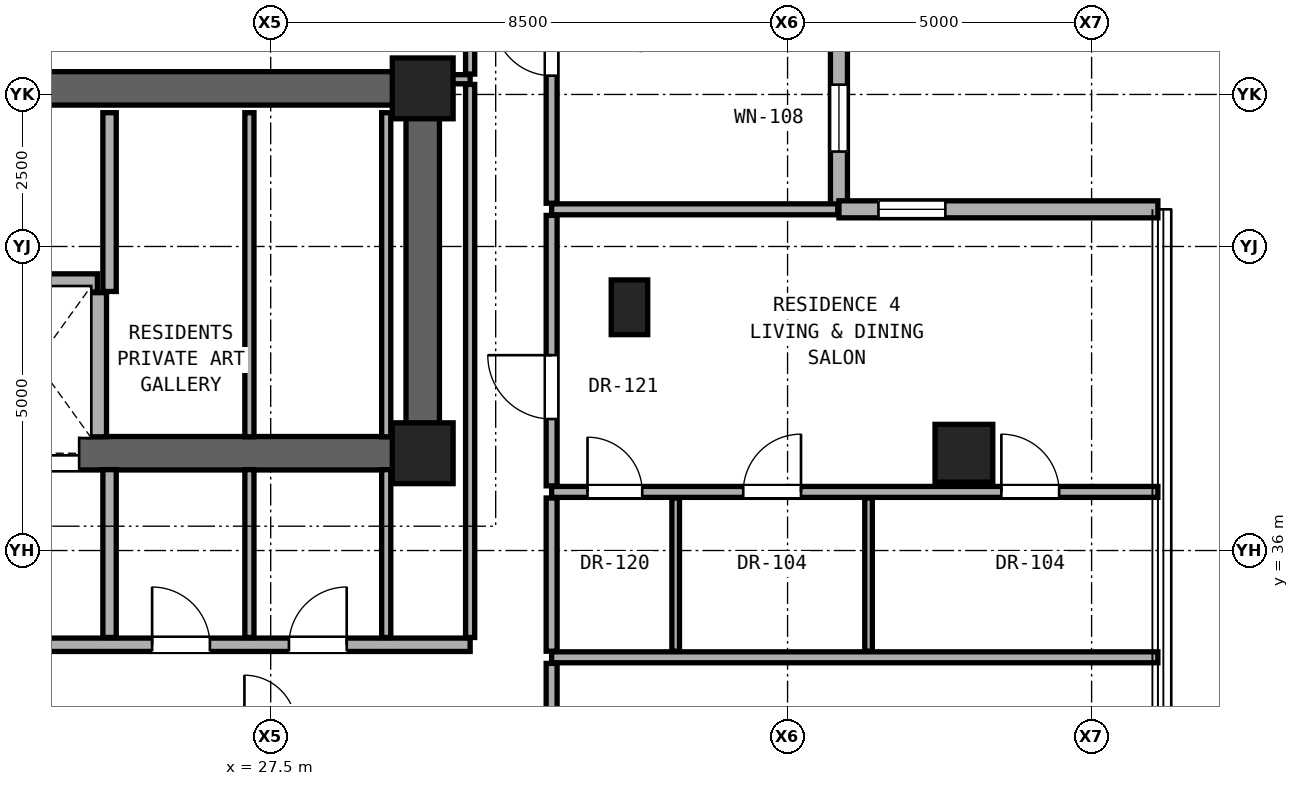
"""IFC4 building model, lengths in metres.
Left out: names, types, materials, properties, quantities, classifications, styles, units other than length and angle.
Written with IfcOpenShell. Run it as: python <this file> out.ifc"""

import sys

from ifc_helpers import new_model, si_unit, direction, frame, frame_2d, origin, origin_2d, place, context, subcontext, project, spatial, rectangle, hollow_rectangle, extrude, element, fill, save


model = new_model("IFC4")
c1 = context("Model", 3, precision=1e-05, world=origin(), true_north=direction((0.0, 1.0)))
c2 = subcontext(c1, "Body", "Model", "MODEL_VIEW")
j1 = project(units=[si_unit("LENGTHUNIT", "METRE"), si_unit("PLANEANGLEUNIT", "RADIAN")], contexts=[c1])
p1 = place(None, origin())
s1 = spatial("IfcSite", under=j1, at=p1, CompositionType="ELEMENT")
p2 = place(p1, origin())
s2 = spatial("IfcBuilding", under=s1, at=p2, CompositionType="ELEMENT")
p3 = place(p2, frame((0.0, 0.0, 177.15)))
s3 = spatial("IfcBuildingStorey", under=s2, at=p3, CompositionType="ELEMENT", Elevation=177.15)
for number, where, z_axis, x_axis in (
    (1, (30.0, 37.6, 0.0), (0.0, 0.0, 1.0), (1.0, 0.0, 0.0)),
    (2, (30.0, 43.6, 0.0), (0.0, 0.0, 1.0), (1.0, 0.0, 0.0)),
):
    element("IfcColumn", number, at=place(p3, frame(where, z_axis=z_axis, x_axis=x_axis)), inside=s3, PredefinedType="COLUMN", context=c2, shape_type="SweptSolid", body=[
        extrude(rectangle(XDim=1.0, YDim=1.0, at=origin_2d()), origin(), (0.0, 0.0, 1.0), 3.25),
    ])
p4 = place(p3, frame((38.9, 37.6, 0.0), z_axis=(0.0, 0.0, 1.0), x_axis=(1.0, 0.0, 0.0)))
e3 = element("IfcColumn", 3, at=p4, inside=s3, PredefinedType="COLUMN", context=c2, shape_type="SweptSolid", body=[
    extrude(hollow_rectangle(XDim=0.95, YDim=0.95, WallThickness=0.05, at=origin_2d()), origin(), (0.0, 0.0, 1.0), 3.25),
])
p5 = place(p3, frame((33.4, 40.0, 0.0), z_axis=(0.0, 0.0, 1.0), x_axis=(1.0, 0.0, 0.0)))
e4 = element("IfcColumn", 4, at=p5, inside=s3, PredefinedType="PILASTER", context=c2, shape_type="SweptSolid", body=[
    extrude(rectangle(XDim=0.6, YDim=0.9, at=origin_2d()), origin(), (0.0, 0.0, 1.0), 3.25),
])
p6 = place(p3, frame((11.0, 43.6, 0.0), z_axis=(0.0, 0.0, 1.0), x_axis=(1.0, 0.0, 0.0)))
e5 = element("IfcWall", 5, at=p6, inside=s3, PredefinedType="SHEAR", context=c2, shape_type="SweptSolid", body=[
    extrude(rectangle(XDim=19.0, YDim=0.55, at=frame_2d((9.5, 0.0))), origin(), (0.0, 0.0, 1.0), 3.05),
])
p7 = place(p3, frame((30.0, 37.6, 0.0), z_axis=(0.0, 0.0, 1.0), x_axis=(0.0, 1.0, 0.0)))
e6 = element("IfcWall", 6, at=p7, inside=s3, PredefinedType="SHEAR", context=c2, shape_type="SweptSolid", body=[
    extrude(rectangle(XDim=6.0, YDim=0.55, at=frame_2d((3.0, 0.0))), origin(), (0.0, 0.0, 1.0), 3.05),
])
p8 = place(p3, frame((11.0, 37.6, 0.0), z_axis=(0.0, 0.0, 1.0), x_axis=(1.0, 0.0, 0.0)))
e7 = element("IfcWall", 7, at=p8, inside=s3, PredefinedType="SHEAR", context=c2, shape_type="SweptSolid", body=[
    extrude(rectangle(XDim=19.0, YDim=0.55, at=frame_2d((9.5, 0.0))), origin(), (0.0, 0.0, 1.0), 3.05),
])
p9 = place(p8, frame((1.06, 0.0, 0.0)))
e8 = element("IfcOpeningElement", 8, at=p9, cuts=e7, PredefinedType="OPENING", context=c2, shape_type="SweptSolid", body=[
    extrude(rectangle(XDim=1.15, YDim=2.2, at=frame_2d((0.575, 1.1))), frame((0.0, 0.285, 0.0), z_axis=(0.0, -1.0, 0.0), x_axis=(1.0, 0.0, 0.0)), (0.0, 0.0, 1.0), 0.57),
])
p10 = place(p8, frame((9.55, 0.0, 0.0)))
e9 = element("IfcOpeningElement", 9, at=p10, cuts=e7, PredefinedType="OPENING", context=c2, shape_type="SweptSolid", body=[
    extrude(rectangle(XDim=1.4, YDim=2.35, at=frame_2d((0.7, 1.175))), frame((0.0, 0.285, 0.0), z_axis=(0.0, -1.0, 0.0), x_axis=(1.0, 0.0, 0.0)), (0.0, 0.0, 1.0), 0.57),
])
p11 = place(p8, frame((11.95, 0.0, 0.0)))
e10 = element("IfcOpeningElement", 10, at=p11, cuts=e7, PredefinedType="OPENING", context=c2, shape_type="SweptSolid", body=[
    extrude(rectangle(XDim=1.4, YDim=2.35, at=frame_2d((0.7, 1.175))), frame((0.0, 0.285, 0.0), z_axis=(0.0, -1.0, 0.0), x_axis=(1.0, 0.0, 0.0)), (0.0, 0.0, 1.0), 0.57),
])
p12 = place(p3, frame((36.845, 41.611, 0.0), z_axis=(0.0, 0.0, 1.0), x_axis=(0.0, 1.0, 0.0)))
e11 = element("IfcWall", 11, at=p12, inside=s3, PredefinedType="SOLIDWALL", context=c2, shape_type="SweptSolid", body=[
    extrude(rectangle(XDim=5.245, YDim=0.28, at=frame_2d((2.623, 0.0))), origin(), (0.0, 0.0, 1.0), 3.03),
])
p13 = place(p12, frame((0.95, 0.0, 0.85)))
e12 = element("IfcOpeningElement", 12, at=p13, cuts=e11, PredefinedType="OPENING", context=c2, shape_type="SweptSolid", body=[
    extrude(rectangle(XDim=1.1, YDim=2.0, at=frame_2d((0.55, 1.0))), frame((0.0, 0.15, 0.0), z_axis=(0.0, -1.0, 0.0), x_axis=(1.0, 0.0, 0.0)), (0.0, 0.0, 1.0), 0.3),
])
p14 = place(p3, frame((42.09, 41.611, 0.0), z_axis=(0.0, 0.0, 1.0), x_axis=(-1.0, 0.0, 0.0)))
e13 = element("IfcWall", 13, at=p14, inside=s3, PredefinedType="SOLIDWALL", context=c2, shape_type="SweptSolid", body=[
    extrude(rectangle(XDim=5.245, YDim=0.28, at=frame_2d((2.623, 0.0))), origin(), (0.0, 0.0, 1.0), 3.03),
])
p15 = place(p14, frame((3.495, 0.0, 0.85)))
e14 = element("IfcOpeningElement", 14, at=p15, cuts=e13, PredefinedType="OPENING", context=c2, shape_type="SweptSolid", body=[
    extrude(rectangle(XDim=1.1, YDim=2.0, at=frame_2d((0.55, 1.0))), frame((0.0, 0.15, 0.0), z_axis=(0.0, -1.0, 0.0), x_axis=(1.0, 0.0, 0.0)), (0.0, 0.0, 1.0), 0.3),
])
p16 = place(p3, frame((32.12, 34.244, 0.0), z_axis=(0.0, 0.0, 1.0), x_axis=(1.0, 0.0, 0.0)))
e15 = element("IfcWall", 15, at=p16, inside=s3, PredefinedType="PARTITIONING", context=c2, shape_type="SweptSolid", body=[
    extrude(rectangle(XDim=9.97, YDim=0.18, at=frame_2d((4.985, 0.0))), origin(), (0.0, 0.0, 1.0), 2.269),
])
p17 = place(p3, frame((15.59, 34.45, 0.0), z_axis=(0.0, 0.0, 1.0), x_axis=(1.0, 0.0, 0.0)))
e16 = element("IfcWall", 16, at=p17, inside=s3, PredefinedType="SOLIDWALL", context=c2, shape_type="SweptSolid", body=[
    extrude(rectangle(XDim=15.19, YDim=0.22, at=frame_2d((7.595, 0.0))), origin(), (0.0, 0.0, 1.0), 2.186),
])
p18 = place(p17, frame((6.435, 0.0, 0.0)))
e17 = element("IfcOpeningElement", 17, at=p18, cuts=e16, PredefinedType="OPENING", context=c2, shape_type="SweptSolid", body=[
    extrude(rectangle(XDim=0.85, YDim=2.01, at=frame_2d((0.425, 1.005))), frame((0.0, 0.12, 0.0), z_axis=(0.0, -1.0, 0.0), x_axis=(1.0, 0.0, 0.0)), (0.0, 0.0, 1.0), 0.24),
])
p19 = place(p17, frame((9.96, 0.0, 0.0)))
e18 = element("IfcOpeningElement", 18, at=p19, cuts=e16, PredefinedType="OPENING", context=c2, shape_type="SweptSolid", body=[
    extrude(rectangle(XDim=0.95, YDim=2.15, at=frame_2d((0.475, 1.075))), frame((0.0, 0.12, 0.0), z_axis=(0.0, -1.0, 0.0), x_axis=(1.0, 0.0, 0.0)), (0.0, 0.0, 1.0), 0.24),
])
p20 = place(p17, frame((12.21, 0.0, 0.0)))
e19 = element("IfcOpeningElement", 19, at=p20, cuts=e16, PredefinedType="OPENING", context=c2, shape_type="SweptSolid", body=[
    extrude(rectangle(XDim=0.95, YDim=2.15, at=frame_2d((0.475, 1.075))), frame((0.0, 0.12, 0.0), z_axis=(0.0, -1.0, 0.0), x_axis=(1.0, 0.0, 0.0)), (0.0, 0.0, 1.0), 0.24),
])
p21 = place(p17, frame((0.675, 0.0, 0.0)))
e20 = element("IfcOpeningElement", 20, at=p21, cuts=e16, PredefinedType="OPENING", context=c2, shape_type="SweptSolid", body=[
    extrude(rectangle(XDim=0.85, YDim=2.01, at=frame_2d((0.425, 1.005))), frame((0.0, 0.12, 0.0), z_axis=(0.0, -1.0, 0.0), x_axis=(1.0, 0.0, 0.0)), (0.0, 0.0, 1.0), 0.24),
])
p22 = place(p17, frame((2.835, 0.0, 0.0)))
e21 = element("IfcOpeningElement", 21, at=p22, cuts=e16, PredefinedType="OPENING", context=c2, shape_type="SweptSolid", body=[
    extrude(rectangle(XDim=0.85, YDim=2.01, at=frame_2d((0.425, 1.005))), frame((0.0, 0.12, 0.0), z_axis=(0.0, -1.0, 0.0), x_axis=(1.0, 0.0, 0.0)), (0.0, 0.0, 1.0), 0.24),
])
p23 = place(p3, frame((32.12, 36.964, 0.0), z_axis=(0.0, 0.0, 1.0), x_axis=(1.0, 0.0, 0.0)))
e22 = element("IfcWall", 22, at=p23, inside=s3, PredefinedType="PARTITIONING", context=c2, shape_type="SweptSolid", body=[
    extrude(rectangle(XDim=9.97, YDim=0.18, at=frame_2d((4.985, 0.0))), origin(), (0.0, 0.0, 1.0), 2.269),
])
p24 = place(p23, frame((7.396, 0.0, 0.0)))
e23 = element("IfcOpeningElement", 23, at=p24, cuts=e22, PredefinedType="OPENING", context=c2, shape_type="SweptSolid", body=[
    extrude(rectangle(XDim=0.95, YDim=2.15, at=frame_2d((0.475, 1.075))), frame((0.0, 0.1, 0.0), z_axis=(0.0, -1.0, 0.0), x_axis=(1.0, 0.0, 0.0)), (0.0, 0.0, 1.0), 0.2),
])
p25 = place(p23, frame((3.151, 0.0, 0.0)))
e24 = element("IfcOpeningElement", 24, at=p25, cuts=e22, PredefinedType="OPENING", context=c2, shape_type="SweptSolid", body=[
    extrude(rectangle(XDim=0.95, YDim=2.15, at=frame_2d((0.475, 1.075))), frame((0.0, 0.1, 0.0), z_axis=(0.0, -1.0, 0.0), x_axis=(1.0, 0.0, 0.0)), (0.0, 0.0, 1.0), 0.2),
])
p26 = place(p23, frame((0.59, 0.0, 0.0)))
e25 = element("IfcOpeningElement", 25, at=p26, cuts=e22, PredefinedType="OPENING", context=c2, shape_type="SweptSolid", body=[
    extrude(rectangle(XDim=0.9, YDim=2.1, at=frame_2d((0.45, 1.05))), frame((0.0, 0.1, 0.0), z_axis=(0.0, -1.0, 0.0), x_axis=(1.0, 0.0, 0.0)), (0.0, 0.0, 1.0), 0.2),
])
p27 = place(p3, frame((20.25, 40.4, 0.0), z_axis=(0.0, 0.0, 1.0), x_axis=(1.0, 0.0, 0.0)))
e26 = element("IfcWall", 26, at=p27, inside=s3, PredefinedType="SOLIDWALL", context=c2, shape_type="SweptSolid", body=[
    extrude(rectangle(XDim=4.4, YDim=0.3, at=frame_2d((2.2, 0.0))), origin(), (0.0, 0.0, 1.0), 3.05),
])
p28 = place(p3, frame((32.12, 41.611, 0.0), z_axis=(0.0, 0.0, 1.0), x_axis=(1.0, 0.0, 0.0)))
e27 = element("IfcWall", 27, at=p28, inside=s3, PredefinedType="PARTITIONING", context=c2, shape_type="SweptSolid", body=[
    extrude(rectangle(XDim=4.705, YDim=0.18, at=frame_2d((2.353, 0.0))), origin(), (0.0, 0.0, 1.0), 3.05),
])
p29 = place(p3, frame((30.27, 43.75, 0.0), z_axis=(0.0, 0.0, 1.0), x_axis=(1.0, 0.0, 0.0)))
e28 = element("IfcWall", 28, at=p29, inside=s3, PredefinedType="PARTITIONING", context=c2, shape_type="SweptSolid", body=[
    extrude(rectangle(XDim=0.51, YDim=0.15, at=frame_2d((0.255, 0.0))), origin(), (0.0, 0.0, 1.0), 3.05),
])
p30 = place(p3, frame((24.65, 37.87, 0.0), z_axis=(0.0, 0.0, 1.0), x_axis=(0.0, 1.0, 0.0)))
e29 = element("IfcWall", 29, at=p30, inside=s3, PredefinedType="SOLIDWALL", context=c2, shape_type="SweptSolid", body=[
    extrude(rectangle(XDim=2.37, YDim=0.3, at=frame_2d((1.185, 0.0))), origin(), (0.0, 0.0, 1.0), 3.05),
])
p31 = place(p3, frame((24.85, 34.57, 0.0), z_axis=(0.0, 0.0, 1.0), x_axis=(0.0, 1.0, 0.0)))
e30 = element("IfcWall", 30, at=p31, inside=s3, PredefinedType="SOLIDWALL", context=c2, shape_type="SweptSolid", body=[
    extrude(rectangle(XDim=2.76, YDim=0.22, at=frame_2d((1.38, 0.0))), origin(), (0.0, 0.0, 1.0), 3.05),
])
p32 = place(p3, frame((24.85, 40.26, 0.0), z_axis=(0.0, 0.0, 1.0), x_axis=(0.0, 1.0, 0.0)))
e31 = element("IfcWall", 31, at=p32, inside=s3, PredefinedType="SOLIDWALL", context=c2, shape_type="SweptSolid", body=[
    extrude(rectangle(XDim=2.94, YDim=0.22, at=frame_2d((1.47, 0.0))), origin(), (0.0, 0.0, 1.0), 3.05),
])
p33 = place(p3, frame((27.15, 34.57, 0.0), z_axis=(0.0, 0.0, 1.0), x_axis=(0.0, 1.0, 0.0)))
e32 = element("IfcWall", 32, at=p33, inside=s3, PredefinedType="PARTITIONING", context=c2, shape_type="SweptSolid", body=[
    extrude(rectangle(XDim=2.76, YDim=0.15, at=frame_2d((1.38, 0.0))), origin(), (0.0, 0.0, 1.0), 3.05),
])
p34 = place(p3, frame((27.15, 37.87, 0.0), z_axis=(0.0, 0.0, 1.0), x_axis=(0.0, 1.0, 0.0)))
e33 = element("IfcWall", 33, at=p34, inside=s3, PredefinedType="PARTITIONING", context=c2, shape_type="SweptSolid", body=[
    extrude(rectangle(XDim=5.33, YDim=0.15, at=frame_2d((2.665, 0.0))), origin(), (0.0, 0.0, 1.0), 3.05),
])
p35 = place(p3, frame((29.4, 34.57, 0.0), z_axis=(0.0, 0.0, 1.0), x_axis=(0.0, 1.0, 0.0)))
e34 = element("IfcWall", 34, at=p35, inside=s3, PredefinedType="PARTITIONING", context=c2, shape_type="SweptSolid", body=[
    extrude(rectangle(XDim=2.76, YDim=0.15, at=frame_2d((1.38, 0.0))), origin(), (0.0, 0.0, 1.0), 3.05),
])
p36 = place(p3, frame((29.4, 37.87, 0.0), z_axis=(0.0, 0.0, 1.0), x_axis=(0.0, 1.0, 0.0)))
e35 = element("IfcWall", 35, at=p36, inside=s3, PredefinedType="PARTITIONING", context=c2, shape_type="SweptSolid", body=[
    extrude(rectangle(XDim=5.33, YDim=0.15, at=frame_2d((2.665, 0.0))), origin(), (0.0, 0.0, 1.0), 3.05),
])
p37 = place(p3, frame((30.78, 34.57, 0.0), z_axis=(0.0, 0.0, 1.0), x_axis=(0.0, 1.0, 0.0)))
e36 = element("IfcWall", 36, at=p37, inside=s3, PredefinedType="PARTITIONING", context=c2, shape_type="SweptSolid", body=[
    extrude(rectangle(XDim=9.095, YDim=0.15, at=frame_2d((4.547, 0.0))), origin(), (0.0, 0.0, 1.0), 2.442),
])
p38 = place(p3, frame((30.78, 43.835, 0.0), z_axis=(0.0, 0.0, 1.0), x_axis=(0.0, 1.0, 0.0)))
e37 = element("IfcWall", 37, at=p38, inside=s3, PredefinedType="PARTITIONING", context=c2, shape_type="SweptSolid", body=[
    extrude(rectangle(XDim=3.021, YDim=0.15, at=frame_2d((1.51, 0.0))), origin(), (0.0, 0.0, 1.0), 3.05),
])
p39 = place(p38, frame((0.986, 0.0, 0.0)))
e38 = element("IfcOpeningElement", 38, at=p39, cuts=e37, PredefinedType="OPENING", context=c2, shape_type="SweptSolid", body=[
    extrude(rectangle(XDim=1.05, YDim=2.2, at=frame_2d((0.525, 1.1))), frame((0.0, 0.085, 0.0), z_axis=(0.0, -1.0, 0.0), x_axis=(1.0, 0.0, 0.0)), (0.0, 0.0, 1.0), 0.17),
])
p40 = place(p3, frame((32.12, 30.631, 0.0), z_axis=(0.0, 0.0, 1.0), x_axis=(0.0, 1.0, 0.0)))
e39 = element("IfcWall", 39, at=p40, inside=s3, PredefinedType="PARTITIONING", context=c2, shape_type="SweptSolid", body=[
    extrude(rectangle(XDim=3.513, YDim=0.18, at=frame_2d((1.756, 0.0))), origin(), (0.0, 0.0, 1.0), 2.346),
])
p41 = place(p40, frame((1.231, 0.0, 0.0)))
e40 = element("IfcOpeningElement", 40, at=p41, cuts=e39, PredefinedType="OPENING", context=c2, shape_type="SweptSolid", body=[
    extrude(rectangle(XDim=1.05, YDim=2.2, at=frame_2d((0.525, 1.1))), frame((0.0, 0.1, 0.0), z_axis=(0.0, -1.0, 0.0), x_axis=(1.0, 0.0, 0.0)), (0.0, 0.0, 1.0), 0.2),
])
p42 = place(p3, frame((32.12, 34.344, 0.0), z_axis=(0.0, 0.0, 1.0), x_axis=(0.0, 1.0, 0.0)))
e41 = element("IfcWall", 41, at=p42, inside=s3, PredefinedType="PARTITIONING", context=c2, shape_type="SweptSolid", body=[
    extrude(rectangle(XDim=2.52, YDim=0.18, at=frame_2d((1.26, 0.0))), origin(), (0.0, 0.0, 1.0), 3.05),
])
p43 = place(p3, frame((32.12, 37.064, 0.0), z_axis=(0.0, 0.0, 1.0), x_axis=(0.0, 1.0, 0.0)))
e42 = element("IfcWall", 42, at=p43, inside=s3, PredefinedType="PARTITIONING", context=c2, shape_type="SweptSolid", body=[
    extrude(rectangle(XDim=4.447, YDim=0.18, at=frame_2d((2.224, 0.0))), origin(), (0.0, 0.0, 1.0), 2.442),
])
p44 = place(p43, frame((1.098, 0.0, 0.0)))
e43 = element("IfcOpeningElement", 43, at=p44, cuts=e42, PredefinedType="OPENING", context=c2, shape_type="SweptSolid", body=[
    extrude(rectangle(XDim=1.05, YDim=2.2, at=frame_2d((0.525, 1.1))), frame((0.0, 0.1, 0.0), z_axis=(0.0, -1.0, 0.0), x_axis=(1.0, 0.0, 0.0)), (0.0, 0.0, 1.0), 0.2),
])
p45 = place(p3, frame((32.12, 41.711, 0.0), z_axis=(0.0, 0.0, 1.0), x_axis=(0.0, 1.0, 0.0)))
e44 = element("IfcWall", 44, at=p45, inside=s3, PredefinedType="PARTITIONING", context=c2, shape_type="SweptSolid", body=[
    extrude(rectangle(XDim=5.145, YDim=0.18, at=frame_2d((2.573, 0.0))), origin(), (0.0, 0.0, 1.0), 3.05),
])
p46 = place(p45, frame((2.097, 0.0, 0.0)))
e45 = element("IfcOpeningElement", 45, at=p46, cuts=e44, PredefinedType="OPENING", context=c2, shape_type="SweptSolid", body=[
    extrude(rectangle(XDim=0.95, YDim=2.15, at=frame_2d((0.475, 1.075))), frame((0.0, 0.1, 0.0), z_axis=(0.0, -1.0, 0.0), x_axis=(1.0, 0.0, 0.0)), (0.0, 0.0, 1.0), 0.2),
])
for number, where, z_axis, x_axis in (
    (46, (34.16, 34.344, 0.0), (0.0, 0.0, 1.0), (0.0, 1.0, 0.0)),
    (47, (37.332, 34.344, 0.0), (0.0, 0.0, 1.0), (0.0, 1.0, 0.0)),
):
    element("IfcWall", number, at=place(p3, frame(where, z_axis=z_axis, x_axis=x_axis)), inside=s3, PredefinedType="PARTITIONING", context=c2, shape_type="SweptSolid", body=[
        extrude(rectangle(XDim=2.52, YDim=0.125, at=frame_2d((1.26, 0.0))), origin(), (0.0, 0.0, 1.0), 3.05),
    ])
p47 = place(p13, origin())
e48 = element("IfcWindow", 48, at=p47, inside=s3, PartitioningType="SINGLE_PANEL", PredefinedType="WINDOW", context=c2, shape_type="SweptSolid", body=[
    extrude(rectangle(XDim=1.1, YDim=2.0, at=frame_2d((0.55, 1.0))), frame((0.0, 0.03, 0.0), z_axis=(0.0, -1.0, 0.0), x_axis=(1.0, 0.0, 0.0)), (0.0, 0.0, 1.0), 0.06),
])
fill(e12, e48)
p48 = place(p15, origin())
e49 = element("IfcWindow", 49, at=p48, inside=s3, PartitioningType="SINGLE_PANEL", PredefinedType="WINDOW", context=c2, shape_type="SweptSolid", body=[
    extrude(rectangle(XDim=1.1, YDim=2.0, at=frame_2d((0.55, 1.0))), frame((0.0, 0.03, 0.0), z_axis=(0.0, -1.0, 0.0), x_axis=(1.0, 0.0, 0.0)), (0.0, 0.0, 1.0), 0.06),
])
fill(e14, e49)
p49 = place(p19, origin())
e50 = element("IfcDoor", 50, at=p49, inside=s3, OperationType="SINGLE_SWING_LEFT", PredefinedType="DOOR", context=c2, shape_type="SweptSolid", body=[
    extrude(rectangle(XDim=0.95, YDim=2.15, at=frame_2d((0.475, 1.075))), frame((0.0, 0.025, 0.0), z_axis=(0.0, -1.0, 0.0), x_axis=(1.0, 0.0, 0.0)), (0.0, 0.0, 1.0), 0.05),
])
fill(e18, e50)
p50 = place(p20, origin())
e51 = element("IfcDoor", 51, at=p50, inside=s3, OperationType="SINGLE_SWING_RIGHT", PredefinedType="DOOR", context=c2, shape_type="SweptSolid", body=[
    extrude(rectangle(XDim=0.95, YDim=2.15, at=frame_2d((0.475, 1.075))), frame((0.0, 0.025, 0.0), z_axis=(0.0, -1.0, 0.0), x_axis=(1.0, 0.0, 0.0)), (0.0, 0.0, 1.0), 0.05),
])
fill(e19, e51)
p51 = place(p44, origin())
e52 = element("IfcDoor", 52, at=p51, inside=s3, OperationType="SINGLE_SWING_RIGHT", PredefinedType="DOOR", context=c2, shape_type="SweptSolid", body=[
    extrude(rectangle(XDim=1.05, YDim=2.2, at=frame_2d((0.525, 1.1))), frame((0.0, 0.025, 0.0), z_axis=(0.0, -1.0, 0.0), x_axis=(1.0, 0.0, 0.0)), (0.0, 0.0, 1.0), 0.05),
])
fill(e43, e52)
p52 = place(p24, origin())
e53 = element("IfcDoor", 53, at=p52, inside=s3, OperationType="SINGLE_SWING_LEFT", PredefinedType="DOOR", context=c2, shape_type="SweptSolid", body=[
    extrude(rectangle(XDim=0.95, YDim=2.15, at=frame_2d((0.475, 1.075))), frame((0.0, 0.025, 0.0), z_axis=(0.0, -1.0, 0.0), x_axis=(1.0, 0.0, 0.0)), (0.0, 0.0, 1.0), 0.05),
])
fill(e23, e53)
p53 = place(p25, origin())
e54 = element("IfcDoor", 54, at=p53, inside=s3, OperationType="SINGLE_SWING_RIGHT", PredefinedType="DOOR", context=c2, shape_type="SweptSolid", body=[
    extrude(rectangle(XDim=0.95, YDim=2.15, at=frame_2d((0.475, 1.075))), frame((0.0, 0.025, 0.0), z_axis=(0.0, -1.0, 0.0), x_axis=(1.0, 0.0, 0.0)), (0.0, 0.0, 1.0), 0.05),
])
fill(e24, e54)
p54 = place(p26, origin())
e55 = element("IfcDoor", 55, at=p54, inside=s3, OperationType="SINGLE_SWING_LEFT", PredefinedType="DOOR", context=c2, shape_type="SweptSolid", body=[
    extrude(rectangle(XDim=0.9, YDim=2.1, at=frame_2d((0.45, 1.05))), frame((0.0, 0.025, 0.0), z_axis=(0.0, -1.0, 0.0), x_axis=(1.0, 0.0, 0.0)), (0.0, 0.0, 1.0), 0.05),
])
fill(e25, e55)
p55 = place(p46, origin())
e56 = element("IfcDoor", 56, at=p55, inside=s3, OperationType="SINGLE_SWING_RIGHT", PredefinedType="DOOR", context=c2, shape_type="SweptSolid", body=[
    extrude(rectangle(XDim=0.95, YDim=2.15, at=frame_2d((0.475, 1.075))), frame((0.0, 0.025, 0.0), z_axis=(0.0, -1.0, 0.0), x_axis=(1.0, 0.0, 0.0)), (0.0, 0.0, 1.0), 0.05),
])
fill(e45, e56)
p56 = place(p11, origin())
e57 = element("IfcDoor", 57, at=p56, inside=s3, OperationType="DOUBLE_DOOR_SLIDING", PredefinedType="DOOR", context=c2, shape_type="SweptSolid", body=[
    extrude(rectangle(XDim=1.4, YDim=2.35, at=frame_2d((0.7, 1.175))), frame((0.0, 0.025, 0.0), z_axis=(0.0, -1.0, 0.0), x_axis=(1.0, 0.0, 0.0)), (0.0, 0.0, 1.0), 0.05),
])
fill(e10, e57)
save(model, sys.argv[1])
